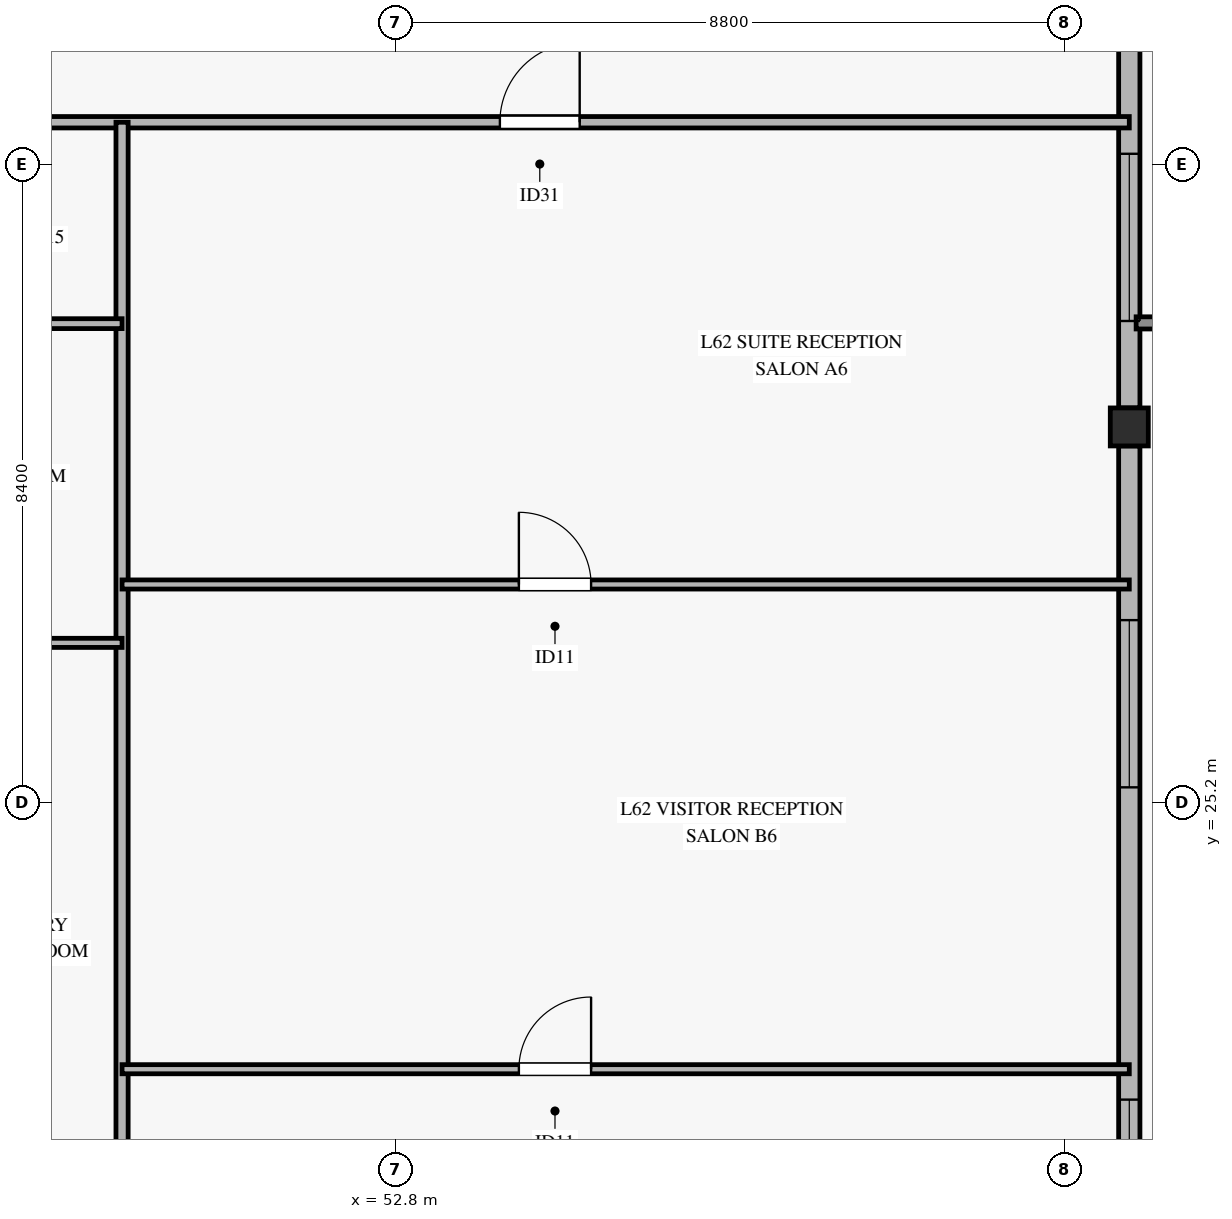
"""IFC4 building model, lengths in metres.
Left out: names, types, materials, properties, quantities, classifications, styles, units other than length and angle.
Written with IfcOpenShell. Run it as: python <this file> out.ifc"""

import sys

from ifc_helpers import new_model, si_unit, direction, frame, frame_2d, origin, origin_2d, place, context, subcontext, project, spatial, rectangle, hollow_rectangle, extrude, source, transform, mapped, element, fill, save


model = new_model("IFC4")
c1 = context("Model", 3, precision=1e-05, world=origin(), true_north=direction((0.0, 1.0)))
c2 = subcontext(c1, "Body", "Model", "MODEL_VIEW")
j1 = project(units=[si_unit("LENGTHUNIT", "METRE"), si_unit("PLANEANGLEUNIT", "RADIAN")], contexts=[c1])
p1 = place(None, origin())
s1 = spatial("IfcSite", under=j1, at=p1, CompositionType="ELEMENT")
p2 = place(p1, origin())
s2 = spatial("IfcBuilding", under=s1, at=p2, CompositionType="ELEMENT")
p3 = place(p2, frame((0.0, 0.0, 245.1)))
s3 = spatial("IfcBuildingStorey", under=s2, at=p3, CompositionType="ELEMENT", Elevation=245.1)
m1 = source(origin(), c2, "Body", "SweptSolid", [
    extrude(hollow_rectangle(XDim=0.5, YDim=0.5, WallThickness=0.024, at=origin_2d()), origin(), (0.0, 0.0, 1.0), 3.245),
])
p4 = place(p3, frame((62.452, 30.141, 0.0), z_axis=(-0.127813351332, 0.143536123803, 0.981356779354), x_axis=(-0.746825952664, -0.665019545899, 0.0)))
e1 = element("IfcColumn", 1, at=p4, inside=s3, PredefinedType="COLUMN", context=c2, shape_type="MappedRepresentation", body=[
    mapped(m1, transform((0.0, 0.0, 0.0), x_axis=(1.0, 0.0, 0.0), y_axis=(0.0, 1.0, 0.0), z_axis=(0.0, 0.0, 1.0), scale=1.0)),
])
p5 = place(p3, frame((62.452, 16.843, 0.0), z_axis=(0.0, 0.0, 1.0), x_axis=(0.0, 1.0, 0.0)))
e2 = element("IfcWall", 2, at=p5, inside=s3, PredefinedType="SOLIDWALL", context=c2, shape_type="SweptSolid", body=[
    extrude(rectangle(XDim=13.048, YDim=0.28, at=frame_2d((6.524, 0.0))), origin(), (0.0, 0.0, 1.0), 2.815),
])
p6 = place(p5, frame((2.247, 0.0, 0.45)))
e3 = element("IfcOpeningElement", 3, at=p6, cuts=e2, PredefinedType="OPENING", context=c2, shape_type="SweptSolid", body=[
    extrude(rectangle(XDim=2.2, YDim=2.1, at=frame_2d((1.1, 1.05))), frame((0.0, 0.15, 0.0), z_axis=(0.0, -1.0, 0.0), x_axis=(1.0, 0.0, 0.0)), (0.0, 0.0, 1.0), 0.3),
])
p7 = place(p5, frame((8.556, 0.0, 0.45)))
e4 = element("IfcOpeningElement", 4, at=p7, cuts=e2, PredefinedType="OPENING", context=c2, shape_type="SweptSolid", body=[
    extrude(rectangle(XDim=2.2, YDim=2.1, at=frame_2d((1.1, 1.05))), frame((0.0, 0.15, 0.0), z_axis=(0.0, -1.0, 0.0), x_axis=(1.0, 0.0, 0.0)), (0.0, 0.0, 1.0), 0.3),
])
p8 = place(p3, frame((62.452, 30.391, 0.0), z_axis=(0.0, 0.0, 1.0), x_axis=(0.0, 1.0, 0.0)))
e5 = element("IfcWall", 5, at=p8, inside=s3, PredefinedType="SOLIDWALL", context=c2, shape_type="SweptSolid", body=[
    extrude(rectangle(XDim=13.048, YDim=0.28, at=frame_2d((6.524, 0.0))), origin(), (0.0, 0.0, 1.0), 2.815),
])
p9 = place(p8, frame((1.144, 0.0, 0.45)))
e6 = element("IfcOpeningElement", 6, at=p9, cuts=e5, PredefinedType="OPENING", context=c2, shape_type="SweptSolid", body=[
    extrude(rectangle(XDim=2.2, YDim=2.1, at=frame_2d((1.1, 1.05))), frame((0.0, 0.15, 0.0), z_axis=(0.0, -1.0, 0.0), x_axis=(1.0, 0.0, 0.0)), (0.0, 0.0, 1.0), 0.3),
])
p10 = place(p3, frame((7.948, 34.15, 0.0), z_axis=(0.0, 0.0, 1.0), x_axis=(1.0, 0.0, 0.0)))
e7 = element("IfcWall", 7, at=p10, inside=s3, PredefinedType="PARTITIONING", context=c2, shape_type="SweptSolid", body=[
    extrude(rectangle(XDim=54.504, YDim=0.15, at=frame_2d((27.252, 0.0))), origin(), (0.0, 0.0, 1.0), 2.47),
])
p11 = place(p10, frame((6.043, 0.0, 0.0)))
e8 = element("IfcOpeningElement", 8, at=p11, cuts=e7, PredefinedType="OPENING", context=c2, shape_type="SweptSolid", body=[
    extrude(rectangle(XDim=1.05, YDim=2.15, at=frame_2d((0.525, 1.075))), frame((0.0, 0.085, 0.0), z_axis=(0.0, -1.0, 0.0), x_axis=(1.0, 0.0, 0.0)), (0.0, 0.0, 1.0), 0.17),
])
p12 = place(p10, frame((16.977, 0.0, 0.0)))
e9 = element("IfcOpeningElement", 9, at=p12, cuts=e7, PredefinedType="OPENING", context=c2, shape_type="SweptSolid", body=[
    extrude(rectangle(XDim=1.05, YDim=2.15, at=frame_2d((0.525, 1.075))), frame((0.0, 0.085, 0.0), z_axis=(0.0, -1.0, 0.0), x_axis=(1.0, 0.0, 0.0)), (0.0, 0.0, 1.0), 0.17),
])
p13 = place(p10, frame((23.427, 0.0, 0.0)))
e10 = element("IfcOpeningElement", 10, at=p13, cuts=e7, PredefinedType="OPENING", context=c2, shape_type="SweptSolid", body=[
    extrude(rectangle(XDim=1.05, YDim=2.15, at=frame_2d((0.525, 1.075))), frame((0.0, 0.085, 0.0), z_axis=(0.0, -1.0, 0.0), x_axis=(1.0, 0.0, 0.0)), (0.0, 0.0, 1.0), 0.17),
])
p14 = place(p10, frame((29.827, 0.0, 0.0)))
e11 = element("IfcOpeningElement", 11, at=p14, cuts=e7, PredefinedType="OPENING", context=c2, shape_type="SweptSolid", body=[
    extrude(rectangle(XDim=1.05, YDim=2.15, at=frame_2d((0.525, 1.075))), frame((0.0, 0.085, 0.0), z_axis=(0.0, -1.0, 0.0), x_axis=(1.0, 0.0, 0.0)), (0.0, 0.0, 1.0), 0.17),
])
p15 = place(p10, frame((36.927, 0.0, 0.0)))
e12 = element("IfcOpeningElement", 12, at=p15, cuts=e7, PredefinedType="OPENING", context=c2, shape_type="SweptSolid", body=[
    extrude(rectangle(XDim=1.05, YDim=2.15, at=frame_2d((0.525, 1.075))), frame((0.0, 0.085, 0.0), z_axis=(0.0, -1.0, 0.0), x_axis=(1.0, 0.0, 0.0)), (0.0, 0.0, 1.0), 0.17),
])
p16 = place(p10, frame((46.223, 0.0, 0.0)))
e13 = element("IfcOpeningElement", 13, at=p16, cuts=e7, PredefinedType="OPENING", context=c2, shape_type="SweptSolid", body=[
    extrude(rectangle(XDim=1.05, YDim=2.15, at=frame_2d((0.525, 1.075))), frame((0.0, 0.085, 0.0), z_axis=(0.0, -1.0, 0.0), x_axis=(1.0, 0.0, 0.0)), (0.0, 0.0, 1.0), 0.17),
])
p17 = place(p3, frame((49.2, 14.182, 0.0), z_axis=(0.0, 0.0, 1.0), x_axis=(0.0, 1.0, 0.0)))
e14 = element("IfcWall", 14, at=p17, inside=s3, PredefinedType="PARTITIONING", context=c2, shape_type="SweptSolid", body=[
    extrude(rectangle(XDim=19.968, YDim=0.16, at=frame_2d((9.984, 0.0))), origin(), (0.0, 0.0, 1.0), 2.77),
])
p18 = place(p3, frame((47.21, 31.5, 0.0), z_axis=(0.0, 0.0, 1.0), x_axis=(1.0, 0.0, 0.0)))
e15 = element("IfcWall", 15, at=p18, inside=s3, PredefinedType="PARTITIONING", context=c2, shape_type="SweptSolid", body=[
    extrude(rectangle(XDim=1.99, YDim=0.13, at=frame_2d((0.995, 0.0))), origin(), (0.0, 0.0, 1.0), 3.185),
])
p19 = place(p3, frame((45.3, 27.3, 0.0), z_axis=(0.0, 0.0, 1.0), x_axis=(1.0, 0.0, 0.0)))
e16 = element("IfcWall", 16, at=p19, inside=s3, PredefinedType="PARTITIONING", context=c2, shape_type="SweptSolid", body=[
    extrude(rectangle(XDim=3.9, YDim=0.12, at=frame_2d((1.95, 0.0))), origin(), (0.0, 0.0, 1.0), 3.185),
])
p20 = place(p3, frame((49.2, 21.69, 0.0), z_axis=(0.0, 0.0, 1.0), x_axis=(1.0, 0.0, 0.0)))
e17 = element("IfcWall", 17, at=p20, inside=s3, PredefinedType="PARTITIONING", context=c2, shape_type="SweptSolid", body=[
    extrude(rectangle(XDim=13.252, YDim=0.12, at=frame_2d((6.626, 0.0))), origin(), (0.0, 0.0, 1.0), 2.47),
])
p21 = place(p20, frame((5.221, 0.0, 0.0)))
e18 = element("IfcOpeningElement", 18, at=p21, cuts=e17, PredefinedType="OPENING", context=c2, shape_type="SweptSolid", body=[
    extrude(rectangle(XDim=0.95, YDim=2.1, at=frame_2d((0.475, 1.05))), frame((0.0, 0.07, 0.0), z_axis=(0.0, -1.0, 0.0), x_axis=(1.0, 0.0, 0.0)), (0.0, 0.0, 1.0), 0.14),
])
p22 = place(p3, frame((49.2, 28.068, 0.0), z_axis=(0.0, 0.0, 1.0), x_axis=(1.0, 0.0, 0.0)))
e19 = element("IfcWall", 19, at=p22, inside=s3, PredefinedType="PARTITIONING", context=c2, shape_type="SweptSolid", body=[
    extrude(rectangle(XDim=13.252, YDim=0.12, at=frame_2d((6.626, 0.0))), origin(), (0.0, 0.0, 1.0), 2.47),
])
p23 = place(p22, frame((5.221, 0.0, 0.0)))
e20 = element("IfcOpeningElement", 20, at=p23, cuts=e19, PredefinedType="OPENING", context=c2, shape_type="SweptSolid", body=[
    extrude(rectangle(XDim=0.95, YDim=2.1, at=frame_2d((0.475, 1.05))), frame((0.0, 0.07, 0.0), z_axis=(0.0, -1.0, 0.0), x_axis=(1.0, 0.0, 0.0)), (0.0, 0.0, 1.0), 0.14),
])
m2 = source(origin(), c2, "Body", "SweptSolid", [
    extrude(rectangle(XDim=2.2, YDim=2.1, at=frame_2d((1.1, 1.05))), frame((0.0, 0.03, 0.0), z_axis=(0.0, -1.0, 0.0), x_axis=(1.0, 0.0, 0.0)), (0.0, 0.0, 1.0), 0.06),
])
p24 = place(p6, origin())
e21 = element("IfcWindow", 21, at=p24, inside=s3, PartitioningType="SINGLE_PANEL", PredefinedType="WINDOW", context=c2, shape_type="MappedRepresentation", body=[
    mapped(m2, transform((0.0, 0.0, 0.0), x_axis=(1.0, 0.0, 0.0), y_axis=(0.0, 1.0, 0.0), z_axis=(0.0, 0.0, 1.0), scale=1.0)),
])
fill(e3, e21)
p25 = place(p7, origin())
e22 = element("IfcWindow", 22, at=p25, inside=s3, PartitioningType="SINGLE_PANEL", PredefinedType="WINDOW", context=c2, shape_type="MappedRepresentation", body=[
    mapped(m2, transform((0.0, 0.0, 0.0), x_axis=(1.0, 0.0, 0.0), y_axis=(0.0, 1.0, 0.0), z_axis=(0.0, 0.0, 1.0), scale=1.0)),
])
fill(e4, e22)
p26 = place(p9, origin())
e23 = element("IfcWindow", 23, at=p26, inside=s3, PartitioningType="SINGLE_PANEL", PredefinedType="WINDOW", context=c2, shape_type="MappedRepresentation", body=[
    mapped(m2, transform((0.0, 0.0, 0.0), x_axis=(1.0, 0.0, 0.0), y_axis=(0.0, 1.0, 0.0), z_axis=(0.0, 0.0, 1.0), scale=1.0)),
])
fill(e6, e23)
m3 = source(origin(), c2, "Body", "SweptSolid", [
    extrude(rectangle(XDim=1.05, YDim=2.15, at=frame_2d((0.525, 1.075))), frame((0.0, 0.025, 0.0), z_axis=(0.0, -1.0, 0.0), x_axis=(1.0, 0.0, 0.0)), (0.0, 0.0, 1.0), 0.05),
])
p27 = place(p16, origin())
e24 = element("IfcDoor", 24, at=p27, inside=s3, OperationType="SINGLE_SWING_RIGHT", PredefinedType="DOOR", context=c2, shape_type="MappedRepresentation", body=[
    mapped(m3, transform((0.0, 0.0, 0.0), x_axis=(1.0, 0.0, 0.0), y_axis=(0.0, 1.0, 0.0), z_axis=(0.0, 0.0, 1.0), scale=1.0)),
])
fill(e13, e24)
m4 = source(origin(), c2, "Body", "SweptSolid", [
    extrude(rectangle(XDim=0.95, YDim=2.1, at=frame_2d((0.475, 1.05))), frame((0.0, 0.025, 0.0), z_axis=(0.0, -1.0, 0.0), x_axis=(1.0, 0.0, 0.0)), (0.0, 0.0, 1.0), 0.05),
])
p28 = place(p23, origin())
e25 = element("IfcDoor", 25, at=p28, inside=s3, OperationType="SINGLE_SWING_LEFT", PredefinedType="DOOR", context=c2, shape_type="MappedRepresentation", body=[
    mapped(m4, transform((0.0, 0.0, 0.0), x_axis=(1.0, 0.0, 0.0), y_axis=(0.0, 1.0, 0.0), z_axis=(0.0, 0.0, 1.0), scale=1.0)),
])
fill(e20, e25)
p29 = place(p21, origin())
e26 = element("IfcDoor", 26, at=p29, inside=s3, OperationType="SINGLE_SWING_RIGHT", PredefinedType="DOOR", context=c2, shape_type="MappedRepresentation", body=[
    mapped(m4, transform((0.0, 0.0, 0.0), x_axis=(1.0, 0.0, 0.0), y_axis=(0.0, 1.0, 0.0), z_axis=(0.0, 0.0, 1.0), scale=1.0)),
])
fill(e18, e26)
save(model, sys.argv[1])
